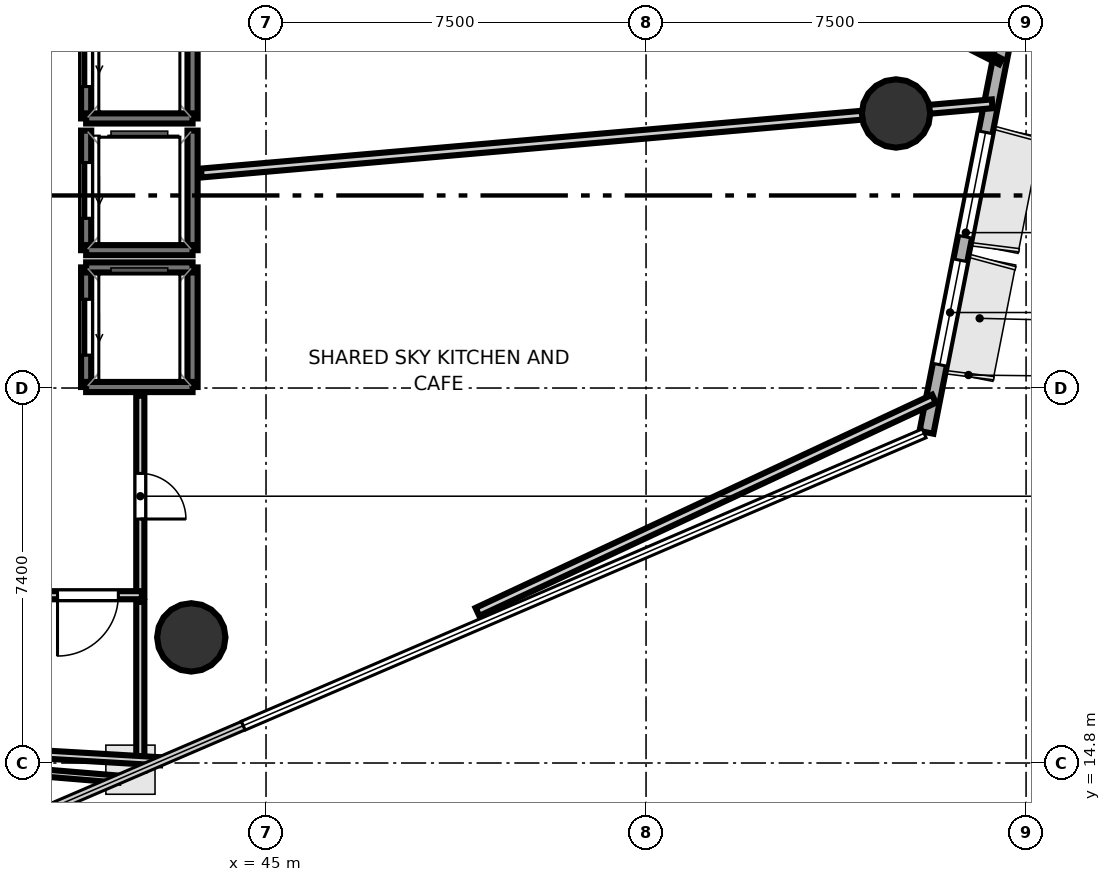
"""IFC4 building model, lengths in metres.
Left out: names, types, materials, properties, quantities, classifications, styles, units other than length and angle.
Written with IfcOpenShell. Run it as: python <this file> out.ifc"""

import sys

from ifc_helpers import new_model, si_unit, direction, frame, frame_2d, origin, origin_2d, place, context, subcontext, project, spatial, rectangle, hollow_circle, extrude, element, fill, save


model = new_model("IFC4")
c1 = context("Model", 3, precision=1e-05, world=origin(), true_north=direction((0.0, 1.0)))
c2 = subcontext(c1, "Body", "Model", "MODEL_VIEW")
j1 = project(units=[si_unit("LENGTHUNIT", "METRE"), si_unit("PLANEANGLEUNIT", "RADIAN")], contexts=[c1])
p1 = place(None, origin())
s1 = spatial("IfcSite", under=j1, at=p1, CompositionType="ELEMENT")
p2 = place(p1, origin())
s2 = spatial("IfcBuilding", under=s1, at=p2, CompositionType="ELEMENT")
p3 = place(p2, frame((0.0, 0.0, 143.1)))
s3 = spatial("IfcBuildingStorey", under=s2, at=p3, CompositionType="ELEMENT", Elevation=143.1)
for number, where, z_axis, x_axis in (
    (1, (57.434, 27.618, -0.27), (0.0, 0.0, 1.0), (1.0, 0.0, 0.0)),
    (2, (43.525, 17.279, -0.27), (0.0, 0.0, 1.0), (1.0, 0.0, 0.0)),
):
    element("IfcColumn", number, at=place(p3, frame(where, z_axis=z_axis, x_axis=x_axis)), inside=s3, PredefinedType="COLUMN", context=c2, shape_type="SweptSolid", body=[
        extrude(hollow_circle(Radius=0.675, WallThickness=0.032, at=origin_2d()), origin(), (0.0, 0.0, 1.0), 4.77),
    ])
p4 = place(p3, frame((58.035, 21.325, 0.0), z_axis=(0.0, 0.0, 1.0), x_axis=(0.193252046098, 0.981149145991, 0.0)))
e3 = element("IfcWall", 3, at=p4, inside=s3, PredefinedType="SOLIDWALL", context=c2, shape_type="SweptSolid", body=[
    extrude(rectangle(XDim=8.035, YDim=0.28, at=frame_2d((4.017, 0.0))), origin(), (0.0, 0.0, 1.0), 4.32),
])
p5 = place(p4, frame((1.36, 0.0, 0.85)))
e4 = element("IfcOpeningElement", 4, at=p5, cuts=e3, PredefinedType="OPENING", context=c2, shape_type="SweptSolid", body=[
    extrude(rectangle(XDim=2.1, YDim=2.2, at=frame_2d((1.05, 1.1))), frame((0.0, 0.15, 0.0), z_axis=(0.0, -1.0, 0.0), x_axis=(1.0, 0.0, 0.0)), (0.0, 0.0, 1.0), 0.3),
])
p6 = place(p4, frame((3.934, 0.0, 0.85)))
e5 = element("IfcOpeningElement", 5, at=p6, cuts=e3, PredefinedType="OPENING", context=c2, shape_type="SweptSolid", body=[
    extrude(rectangle(XDim=2.1, YDim=2.2, at=frame_2d((1.05, 1.1))), frame((0.0, 0.15, 0.0), z_axis=(0.0, -1.0, 0.0), x_axis=(1.0, 0.0, 0.0)), (0.0, 0.0, 1.0), 0.3),
])
p7 = place(p3, frame((43.55, 27.52, 0.0), z_axis=(0.0, 0.0, 1.0), x_axis=(0.0, 1.0, 0.0)))
e6 = element("IfcWall", 6, at=p7, inside=s3, PredefinedType="SOLIDWALL", context=c2, shape_type="SweptSolid", body=[
    extrude(rectangle(XDim=2.36, YDim=0.2, at=frame_2d((1.18, 0.0))), origin(), (0.0, 0.0, 1.0), 4.32),
])
p8 = place(p3, frame((41.45, 27.52, 0.0), z_axis=(0.0, 0.0, 1.0), x_axis=(0.0, 1.0, 0.0)))
e7 = element("IfcWall", 7, at=p8, inside=s3, PredefinedType="SOLIDWALL", context=c2, shape_type="SweptSolid", body=[
    extrude(rectangle(XDim=2.36, YDim=0.2, at=frame_2d((1.18, 0.0))), origin(), (0.0, 0.0, 1.0), 4.32),
])
p9 = place(p8, frame((0.63, 0.0, 0.0)))
e8 = element("IfcOpeningElement", 8, at=p9, cuts=e7, PredefinedType="OPENING", context=c2, shape_type="SweptSolid", body=[
    extrude(rectangle(XDim=1.1, YDim=2.15, at=frame_2d((0.55, 1.075))), frame((0.0, 0.11, 0.0), z_axis=(0.0, -1.0, 0.0), x_axis=(1.0, 0.0, 0.0)), (0.0, 0.0, 1.0), 0.22),
])
p10 = place(p3, frame((41.45, 27.52, 0.0), z_axis=(0.0, 0.0, 1.0), x_axis=(1.0, 0.0, 0.0)))
e9 = element("IfcWall", 9, at=p10, inside=s3, PredefinedType="SOLIDWALL", context=c2, shape_type="SweptSolid", body=[
    extrude(rectangle(XDim=2.1, YDim=0.2, at=frame_2d((1.05, 0.0))), origin(), (0.0, 0.0, 1.0), 4.32),
])
p11 = place(p3, frame((43.55, 24.92, 0.0), z_axis=(0.0, 0.0, 1.0), x_axis=(0.0, 1.0, 0.0)))
e10 = element("IfcWall", 10, at=p11, inside=s3, PredefinedType="SOLIDWALL", context=c2, shape_type="SweptSolid", body=[
    extrude(rectangle(XDim=2.36, YDim=0.2, at=frame_2d((1.18, 0.0))), origin(), (0.0, 0.0, 1.0), 4.32),
])
p12 = place(p3, frame((41.45, 24.92, 0.0), z_axis=(0.0, 0.0, 1.0), x_axis=(0.0, 1.0, 0.0)))
e11 = element("IfcWall", 11, at=p12, inside=s3, PredefinedType="SOLIDWALL", context=c2, shape_type="SweptSolid", body=[
    extrude(rectangle(XDim=2.36, YDim=0.2, at=frame_2d((1.18, 0.0))), origin(), (0.0, 0.0, 1.0), 4.32),
])
p13 = place(p12, frame((0.63, 0.0, 0.0)))
e12 = element("IfcOpeningElement", 12, at=p13, cuts=e11, PredefinedType="OPENING", context=c2, shape_type="SweptSolid", body=[
    extrude(rectangle(XDim=1.1, YDim=2.15, at=frame_2d((0.55, 1.075))), frame((0.0, 0.11, 0.0), z_axis=(0.0, -1.0, 0.0), x_axis=(1.0, 0.0, 0.0)), (0.0, 0.0, 1.0), 0.22),
])
p14 = place(p3, frame((41.45, 24.92, 0.0), z_axis=(0.0, 0.0, 1.0), x_axis=(1.0, 0.0, 0.0)))
e13 = element("IfcWall", 13, at=p14, inside=s3, PredefinedType="SOLIDWALL", context=c2, shape_type="SweptSolid", body=[
    extrude(rectangle(XDim=2.1, YDim=0.2, at=frame_2d((1.05, 0.0))), origin(), (0.0, 0.0, 1.0), 4.32),
])
p15 = place(p3, frame((43.55, 22.22, 0.0), z_axis=(0.0, 0.0, 1.0), x_axis=(0.0, 1.0, 0.0)))
e14 = element("IfcWall", 14, at=p15, inside=s3, PredefinedType="SOLIDWALL", context=c2, shape_type="SweptSolid", body=[
    extrude(rectangle(XDim=2.36, YDim=0.2, at=frame_2d((1.18, 0.0))), origin(), (0.0, 0.0, 1.0), 4.32),
])
p16 = place(p3, frame((41.45, 22.22, 0.0), z_axis=(0.0, 0.0, 1.0), x_axis=(0.0, 1.0, 0.0)))
e15 = element("IfcWall", 15, at=p16, inside=s3, PredefinedType="SOLIDWALL", context=c2, shape_type="SweptSolid", body=[
    extrude(rectangle(XDim=2.36, YDim=0.2, at=frame_2d((1.18, 0.0))), origin(), (0.0, 0.0, 1.0), 4.32),
])
p17 = place(p16, frame((0.63, 0.0, 0.0)))
e16 = element("IfcOpeningElement", 16, at=p17, cuts=e15, PredefinedType="OPENING", context=c2, shape_type="SweptSolid", body=[
    extrude(rectangle(XDim=1.1, YDim=2.15, at=frame_2d((0.55, 1.075))), frame((0.0, 0.11, 0.0), z_axis=(0.0, -1.0, 0.0), x_axis=(1.0, 0.0, 0.0)), (0.0, 0.0, 1.0), 0.22),
])
for number, where, z_axis, x_axis in (
    (17, (41.45, 24.58, 0.0), (0.0, 0.0, 1.0), (1.0, 0.0, 0.0)),
    (18, (41.45, 22.22, 0.0), (0.0, 0.0, 1.0), (1.0, 0.0, 0.0)),
):
    element("IfcWall", number, at=place(p3, frame(where, z_axis=z_axis, x_axis=x_axis)), inside=s3, PredefinedType="SOLIDWALL", context=c2, shape_type="SweptSolid", body=[
        extrude(rectangle(XDim=2.1, YDim=0.2, at=frame_2d((1.05, 0.0))), origin(), (0.0, 0.0, 1.0), 4.32),
    ])
p18 = place(p3, frame((42.519, 22.05, 0.0), z_axis=(0.0, 0.0, 1.0), x_axis=(0.0, -1.0, 0.0)))
e19 = element("IfcWall", 19, at=p18, inside=s3, PredefinedType="PARTITIONING", context=c2, shape_type="SweptSolid", body=[
    extrude(rectangle(XDim=3.97, YDim=0.16, at=frame_2d((1.985, 0.0))), origin(), (0.0, 0.0, 1.0), 3.64),
])
p19 = place(p18, frame((1.535, 0.0, 0.0)))
e20 = element("IfcOpeningElement", 20, at=p19, cuts=e19, PredefinedType="OPENING", context=c2, shape_type="SweptSolid", body=[
    extrude(rectangle(XDim=0.9, YDim=2.1, at=frame_2d((0.45, 1.05))), frame((0.0, 0.09, 0.0), z_axis=(0.0, -1.0, 0.0), x_axis=(1.0, 0.0, 0.0)), (0.0, 0.0, 1.0), 0.18),
])
p20 = place(p3, frame((42.55, 18.111, 0.0), z_axis=(0.0, 0.0, 1.0), x_axis=(-1.0, 0.0, 0.0)))
e21 = element("IfcWall", 21, at=p20, inside=s3, PredefinedType="PARTITIONING", context=c2, shape_type="SweptSolid", body=[
    extrude(rectangle(XDim=2.13, YDim=0.16, at=frame_2d((1.065, 0.0))), origin(), (0.0, 0.0, 1.0), 3.64),
])
p21 = place(p20, frame((0.465, 0.0, 0.0)))
e22 = element("IfcOpeningElement", 22, at=p21, cuts=e21, PredefinedType="OPENING", context=c2, shape_type="SweptSolid", body=[
    extrude(rectangle(XDim=1.2, YDim=2.15, at=frame_2d((0.6, 1.075))), frame((0.0, 0.09, 0.0), z_axis=(0.0, -1.0, 0.0), x_axis=(1.0, 0.0, 0.0)), (0.0, 0.0, 1.0), 0.18),
])
p22 = place(p3, frame((42.519, 17.98, 0.0), z_axis=(0.0, 0.0, 1.0), x_axis=(0.0, -1.0, 0.0)))
e23 = element("IfcWall", 23, at=p22, inside=s3, PredefinedType="PARTITIONING", context=c2, shape_type="SweptSolid", body=[
    extrude(rectangle(XDim=3.335, YDim=0.16, at=frame_2d((1.668, 0.0))), origin(), (0.0, 0.0, 1.0), 3.64),
])
p23 = place(p3, frame((42.914, 14.834, 0.0), z_axis=(0.0, 0.0, 1.0), x_axis=(-0.998301769206, 0.058254421299, 0.0)))
e24 = element("IfcWall", 24, at=p23, inside=s3, PredefinedType="PARTITIONING", context=c2, shape_type="SweptSolid", body=[
    extrude(rectangle(XDim=14.538, YDim=0.16, at=frame_2d((7.269, 0.0))), origin(), (0.0, 0.0, 1.0), 3.64),
])
p24 = place(p23, frame((7.49, 0.0, 0.0)))
e25 = element("IfcOpeningElement", 25, at=p24, cuts=e24, PredefinedType="OPENING", context=c2, shape_type="SweptSolid", body=[
    extrude(rectangle(XDim=1.25, YDim=2.2, at=frame_2d((0.625, 1.1))), frame((0.0, 0.09, 0.0), z_axis=(0.0, -1.0, 0.0), x_axis=(1.0, 0.0, 0.0)), (0.0, 0.0, 1.0), 0.18),
])
p25 = place(p3, frame((35.487, 15.027, 0.0), z_axis=(0.0, 0.0, 1.0), x_axis=(0.996605450561, -0.082326034225, 0.0)))
e26 = element("IfcWall", 26, at=p25, inside=s3, PredefinedType="PARTITIONING", context=c2, shape_type="SweptSolid", body=[
    extrude(rectangle(XDim=6.628, YDim=0.14, at=frame_2d((3.314, 0.0))), origin(), (0.0, 0.0, 1.0), 3.64),
])
p26 = place(p3, frame((43.723, 26.443, 0.0), z_axis=(0.0, 0.0, 1.0), x_axis=(0.996195256439, 0.087149360569, 0.0)))
e27 = element("IfcWall", 27, at=p26, inside=s3, PredefinedType="PLUMBINGWALL", context=c2, shape_type="SweptSolid", body=[
    extrude(rectangle(XDim=15.668, YDim=0.175, at=frame_2d((7.834, 0.0))), origin(), (0.0, 0.0, 1.0), 3.64),
])
p27 = place(p3, frame((58.182, 21.988, 0.0), z_axis=(0.0, 0.0, 1.0), x_axis=(-0.906116634015, -0.423027948913, 0.0)))
e28 = element("IfcWall", 28, at=p27, inside=s3, PredefinedType="PLUMBINGWALL", context=c2, shape_type="SweptSolid", body=[
    extrude(rectangle(XDim=9.943, YDim=0.175, at=frame_2d((4.971, 0.0))), origin(), (0.0, 0.0, 1.0), 3.64),
])
p28 = place(p3, frame((48.675, 34.141, 0.0), z_axis=(0.0, 0.0, 1.0), x_axis=(0.891467205554, -0.45308522534, 0.0)))
e29 = element("IfcWall", 29, at=p28, inside=s3, PredefinedType="PARTITIONING", context=c2, shape_type="SweptSolid", body=[
    extrude(rectangle(XDim=12.138, YDim=0.12, at=frame_2d((6.069, 0.0))), origin(), (0.0, 0.0, 1.0), 3.64),
])
p29 = place(p9, origin())
e30 = element("IfcDoor", 30, at=p29, inside=s3, OperationType="SLIDING_TO_LEFT", PredefinedType="DOOR", context=c2, shape_type="SweptSolid", body=[
    extrude(rectangle(XDim=1.1, YDim=2.15, at=frame_2d((0.55, 1.075))), frame((0.0, 0.025, 0.0), z_axis=(0.0, -1.0, 0.0), x_axis=(1.0, 0.0, 0.0)), (0.0, 0.0, 1.0), 0.05),
])
fill(e8, e30)
p30 = place(p13, origin())
e31 = element("IfcDoor", 31, at=p30, inside=s3, OperationType="SLIDING_TO_LEFT", PredefinedType="DOOR", context=c2, shape_type="SweptSolid", body=[
    extrude(rectangle(XDim=1.1, YDim=2.15, at=frame_2d((0.55, 1.075))), frame((0.0, 0.025, 0.0), z_axis=(0.0, -1.0, 0.0), x_axis=(1.0, 0.0, 0.0)), (0.0, 0.0, 1.0), 0.05),
])
fill(e12, e31)
p31 = place(p17, origin())
e32 = element("IfcDoor", 32, at=p31, inside=s3, OperationType="SLIDING_TO_LEFT", PredefinedType="DOOR", context=c2, shape_type="SweptSolid", body=[
    extrude(rectangle(XDim=1.1, YDim=2.15, at=frame_2d((0.55, 1.075))), frame((0.0, 0.025, 0.0), z_axis=(0.0, -1.0, 0.0), x_axis=(1.0, 0.0, 0.0)), (0.0, 0.0, 1.0), 0.05),
])
fill(e16, e32)
p32 = place(p21, origin())
e33 = element("IfcDoor", 33, at=p32, inside=s3, OperationType="SINGLE_SWING_RIGHT", PredefinedType="DOOR", context=c2, shape_type="SweptSolid", body=[
    extrude(rectangle(XDim=1.2, YDim=2.15, at=frame_2d((0.6, 1.075))), frame((0.0, 0.025, 0.0), z_axis=(0.0, -1.0, 0.0), x_axis=(1.0, 0.0, 0.0)), (0.0, 0.0, 1.0), 0.05),
])
fill(e22, e33)
p33 = place(p19, origin())
e34 = element("IfcDoor", 34, at=p33, inside=s3, OperationType="SINGLE_SWING_RIGHT", PredefinedType="DOOR", context=c2, shape_type="SweptSolid", body=[
    extrude(rectangle(XDim=0.9, YDim=2.1, at=frame_2d((0.45, 1.05))), frame((0.0, 0.025, 0.0), z_axis=(0.0, -1.0, 0.0), x_axis=(1.0, 0.0, 0.0)), (0.0, 0.0, 1.0), 0.05),
])
fill(e20, e34)
p34 = place(p5, origin())
e35 = element("IfcWindow", 35, at=p34, inside=s3, PartitioningType="SINGLE_PANEL", PredefinedType="WINDOW", context=c2, shape_type="SweptSolid", body=[
    extrude(rectangle(XDim=2.1, YDim=2.2, at=frame_2d((1.05, 1.1))), frame((0.0, 0.03, 0.0), z_axis=(0.0, -1.0, 0.0), x_axis=(1.0, 0.0, 0.0)), (0.0, 0.0, 1.0), 0.06),
])
fill(e4, e35)
p35 = place(p6, origin())
e36 = element("IfcWindow", 36, at=p35, inside=s3, PartitioningType="SINGLE_PANEL", PredefinedType="WINDOW", context=c2, shape_type="SweptSolid", body=[
    extrude(rectangle(XDim=2.1, YDim=2.2, at=frame_2d((1.05, 1.1))), frame((0.0, 0.03, 0.0), z_axis=(0.0, -1.0, 0.0), x_axis=(1.0, 0.0, 0.0)), (0.0, 0.0, 1.0), 0.06),
])
fill(e5, e36)
save(model, sys.argv[1])
